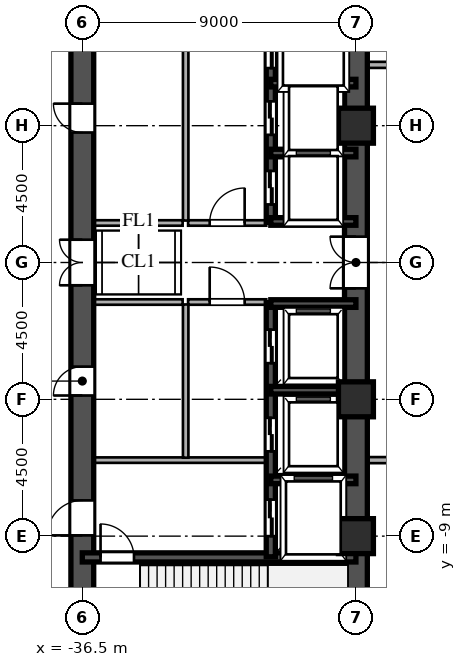
"""IFC4 building model, lengths in metres.
Left out: names, types, materials, properties, quantities, classifications, styles, units other than length and angle.
Written with IfcOpenShell. Run it as: python <this file> out.ifc"""

import sys

from ifc_helpers import new_model, si_unit, direction, frame, frame_2d, origin, origin_2d, place, context, subcontext, project, spatial, rectangle, hollow_rectangle, extrude, source, transform, mapped, element, fill, save


model = new_model("IFC4")
c1 = context("Model", 3, precision=1e-05, world=origin(), true_north=direction((0.0, 1.0)))
c2 = subcontext(c1, "Body", "Model", "MODEL_VIEW")
j1 = project(units=[si_unit("LENGTHUNIT", "METRE"), si_unit("PLANEANGLEUNIT", "RADIAN")], contexts=[c1])
p1 = place(None, origin())
s1 = spatial("IfcSite", under=j1, at=p1, CompositionType="ELEMENT")
p2 = place(p1, origin())
s2 = spatial("IfcBuilding", under=s1, at=p2, CompositionType="ELEMENT")
p3 = place(p2, origin())
s3 = spatial("IfcBuildingStorey", under=s2, at=p3, CompositionType="ELEMENT", Elevation=0.0)
m1 = source(origin(), c2, "Body", "SweptSolid", [
    extrude(hollow_rectangle(XDim=1.15, YDim=1.15, WallThickness=0.048, at=origin_2d()), origin(), (0.0, 0.0, 1.0), 5.4),
])
for number, where, z_axis, x_axis in (
    (1, (-27.5, -9.0, 0.0), (0.0, 0.0, 1.0), (1.0, 0.0, 0.0)),
    (2, (-27.5, -4.5, 0.0), (0.0, 0.0, 1.0), (1.0, 0.0, 0.0)),
    (3, (-27.5, 4.5, 0.0), (0.0, 0.0, 1.0), (1.0, 0.0, 0.0)),
):
    element("IfcColumn", number, at=place(p3, frame(where, z_axis=z_axis, x_axis=x_axis)), inside=s3, PredefinedType="COLUMN", context=c2, shape_type="MappedRepresentation", body=[
        mapped(m1, transform((0.0, 0.0, 0.0), scale=1.0)),
    ])
for number, where, z_axis, x_axis in (
    (4, (-27.5, -13.5, 0.0), (0.0, 0.0, 1.0), (0.0, 1.0, 0.0)),
    (5, (-27.5, 1.3, 0.0), (0.0, 0.0, 1.0), (0.0, 1.0, 0.0)),
):
    element("IfcWall", number, at=place(p3, frame(where, z_axis=z_axis, x_axis=x_axis)), inside=s3, PredefinedType="SHEAR", context=c2, shape_type="SweptSolid", body=[
        extrude(rectangle(XDim=12.2, YDim=0.75, at=frame_2d((6.1, 0.0))), origin(), (0.0, 0.0, 1.0), 5.12),
    ])
p4 = place(p3, frame((-27.5, -1.3, 0.0), z_axis=(0.0, 0.0, 1.0), x_axis=(0.0, 1.0, 0.0)))
e6 = element("IfcWall", 6, at=p4, inside=s3, PredefinedType="SHEAR", context=c2, shape_type="SweptSolid", body=[
    extrude(rectangle(XDim=2.6, YDim=0.75, at=frame_2d((1.3, 0.0))), origin(), (0.0, 0.0, 1.0), 5.12),
])
p5 = place(p4, frame((0.45, 0.0, 0.0)))
e7 = element("IfcOpeningElement", 7, at=p5, cuts=e6, PredefinedType="OPENING", context=c2, shape_type="SweptSolid", body=[
    extrude(rectangle(XDim=1.7, YDim=2.35, at=frame_2d((0.85, 1.175))), frame((0.0, 0.385, 0.0), z_axis=(0.0, -1.0, 0.0), x_axis=(1.0, 0.0, 0.0)), (0.0, 0.0, 1.0), 0.77),
])
p6 = place(p3, frame((-36.5, -13.65, 0.0), z_axis=(0.0, 0.0, 1.0), x_axis=(0.0, 1.0, 0.0)))
e8 = element("IfcWall", 8, at=p6, inside=s3, PredefinedType="SHEAR", context=c2, shape_type="SweptSolid", body=[
    extrude(rectangle(XDim=7.15, YDim=0.75, at=frame_2d((3.575, 0.0))), origin(), (0.0, 0.0, 1.0), 5.12),
])
p7 = place(p6, frame((4.675, 0.0, 0.0)))
e9 = element("IfcOpeningElement", 9, at=p7, cuts=e8, PredefinedType="OPENING", context=c2, shape_type="SweptSolid", body=[
    extrude(rectangle(XDim=1.15, YDim=2.2, at=frame_2d((0.575, 1.1))), frame((0.0, 0.385, 0.0), z_axis=(0.0, -1.0, 0.0), x_axis=(1.0, 0.0, 0.0)), (0.0, 0.0, 1.0), 0.77),
])
p8 = place(p3, frame((-36.5, -1.3, 0.0), z_axis=(0.0, 0.0, 1.0), x_axis=(0.0, 1.0, 0.0)))
e10 = element("IfcWall", 10, at=p8, inside=s3, PredefinedType="SHEAR", context=c2, shape_type="SweptSolid", body=[
    extrude(rectangle(XDim=2.6, YDim=0.75, at=frame_2d((1.3, 0.0))), origin(), (0.0, 0.0, 1.0), 5.12),
])
p9 = place(p8, frame((0.55, 0.0, 0.0)))
e11 = element("IfcOpeningElement", 11, at=p9, cuts=e10, PredefinedType="OPENING", context=c2, shape_type="SweptSolid", body=[
    extrude(rectangle(XDim=1.5, YDim=2.3, at=frame_2d((0.75, 1.15))), frame((0.0, 0.385, 0.0), z_axis=(0.0, -1.0, 0.0), x_axis=(1.0, 0.0, 0.0)), (0.0, 0.0, 1.0), 0.77),
])
p10 = place(p3, frame((-36.5, -6.5, 0.0), z_axis=(0.0, 0.0, 1.0), x_axis=(0.0, 1.0, 0.0)))
e12 = element("IfcWall", 12, at=p10, inside=s3, PredefinedType="SHEAR", context=c2, shape_type="SweptSolid", body=[
    extrude(rectangle(XDim=5.2, YDim=0.75, at=frame_2d((2.6, 0.0))), origin(), (0.0, 0.0, 1.0), 5.12),
])
p11 = place(p10, frame((2.125, 0.0, 0.0)))
e13 = element("IfcOpeningElement", 13, at=p11, cuts=e12, PredefinedType="OPENING", context=c2, shape_type="SweptSolid", body=[
    extrude(rectangle(XDim=0.95, YDim=2.15, at=frame_2d((0.475, 1.075))), frame((0.0, 0.385, 0.0), z_axis=(0.0, -1.0, 0.0), x_axis=(1.0, 0.0, 0.0)), (0.0, 0.0, 1.0), 0.77),
])
p12 = place(p3, frame((-36.5, 1.3, 0.0), z_axis=(0.0, 0.0, 1.0), x_axis=(0.0, 1.0, 0.0)))
e14 = element("IfcWall", 14, at=p12, inside=s3, PredefinedType="SHEAR", context=c2, shape_type="SweptSolid", body=[
    extrude(rectangle(XDim=6.9, YDim=0.75, at=frame_2d((3.45, 0.0))), origin(), (0.0, 0.0, 1.0), 5.12),
])
p13 = place(p12, frame((2.975, 0.0, 0.0)))
e15 = element("IfcOpeningElement", 15, at=p13, cuts=e14, PredefinedType="OPENING", context=c2, shape_type="SweptSolid", body=[
    extrude(rectangle(XDim=0.95, YDim=2.15, at=frame_2d((0.475, 1.075))), frame((0.0, 0.385, 0.0), z_axis=(0.0, -1.0, 0.0), x_axis=(1.0, 0.0, 0.0)), (0.0, 0.0, 1.0), 0.77),
])
p14 = place(p3, frame((-36.5, -9.7, 0.0), z_axis=(0.0, 0.0, 1.0), x_axis=(1.0, 0.0, 0.0)))
e16 = element("IfcWall", 16, at=p14, inside=s3, PredefinedType="SHEAR", context=c2, shape_type="SweptSolid", body=[
    extrude(rectangle(XDim=9.0, YDim=0.3, at=frame_2d((4.5, 0.0))), origin(), (0.0, 0.0, 1.0), 5.12),
])
p15 = place(p14, frame((0.6, 0.0, 0.0)))
e17 = element("IfcOpeningElement", 17, at=p15, cuts=e16, PredefinedType="OPENING", context=c2, shape_type="SweptSolid", body=[
    extrude(rectangle(XDim=1.1, YDim=2.2, at=frame_2d((0.55, 1.1))), frame((0.0, 0.16, 0.0), z_axis=(0.0, -1.0, 0.0), x_axis=(1.0, 0.0, 0.0)), (0.0, 0.0, 1.0), 0.32),
])
for number, where, z_axis, x_axis in (
    (18, (-30.3, -7.15, 0.0), (0.0, 0.0, 1.0), (1.0, 0.0, 0.0)),
    (19, (-30.3, -4.2, 0.0), (0.0, 0.0, 1.0), (1.0, 0.0, 0.0)),
    (20, (-30.3, -1.35, 0.0), (0.0, 0.0, 1.0), (1.0, 0.0, 0.0)),
    (21, (-30.3, 1.35, 0.0), (0.0, 0.0, 1.0), (1.0, 0.0, 0.0)),
    (22, (-30.3, 3.6, 0.0), (0.0, 0.0, 1.0), (1.0, 0.0, 0.0)),
    (23, (-30.3, 5.9, 0.0), (0.0, 0.0, 1.0), (1.0, 0.0, 0.0)),
):
    element("IfcWall", number, at=place(p3, frame(where, z_axis=z_axis, x_axis=x_axis)), inside=s3, PredefinedType="SHEAR", context=c2, shape_type="SweptSolid", body=[
        extrude(rectangle(XDim=2.8, YDim=0.25, at=frame_2d((1.4, 0.0))), origin(), (0.0, 0.0, 1.0), 5.12),
    ])
p16 = place(p3, frame((-30.3, -9.68, 0.0), z_axis=(0.0, 0.0, 1.0), x_axis=(0.0, 1.0, 0.0)))
e24 = element("IfcWall", 24, at=p16, inside=s3, PredefinedType="SHEAR", context=c2, shape_type="SweptSolid", body=[
    extrude(rectangle(XDim=2.56, YDim=0.3, at=frame_2d((1.28, 0.0))), origin(), (0.0, 0.0, 1.0), 5.12),
])
p17 = place(p16, frame((0.68, 0.0, 0.0)))
e25 = element("IfcOpeningElement", 25, at=p17, cuts=e24, PredefinedType="OPENING", context=c2, shape_type="SweptSolid", body=[
    extrude(rectangle(XDim=1.2, YDim=2.25, at=frame_2d((0.6, 1.125))), frame((0.0, 0.16, 0.0), z_axis=(0.0, -1.0, 0.0), x_axis=(1.0, 0.0, 0.0)), (0.0, 0.0, 1.0), 0.32),
])
p18 = place(p3, frame((-30.3, -7.12, 0.0), z_axis=(0.0, 0.0, 1.0), x_axis=(0.0, 1.0, 0.0)))
e26 = element("IfcWall", 26, at=p18, inside=s3, PredefinedType="SHEAR", context=c2, shape_type="SweptSolid", body=[
    extrude(rectangle(XDim=2.92, YDim=0.3, at=frame_2d((1.46, 0.0))), origin(), (0.0, 0.0, 1.0), 5.12),
])
p19 = place(p18, frame((0.91, 0.0, 0.0)))
e27 = element("IfcOpeningElement", 27, at=p19, cuts=e26, PredefinedType="OPENING", context=c2, shape_type="SweptSolid", body=[
    extrude(rectangle(XDim=1.1, YDim=2.2, at=frame_2d((0.55, 1.1))), frame((0.0, 0.16, 0.0), z_axis=(0.0, -1.0, 0.0), x_axis=(1.0, 0.0, 0.0)), (0.0, 0.0, 1.0), 0.32),
])
p20 = place(p3, frame((-30.3, -4.2, 0.0), z_axis=(0.0, 0.0, 1.0), x_axis=(0.0, 1.0, 0.0)))
e28 = element("IfcWall", 28, at=p20, inside=s3, PredefinedType="SHEAR", context=c2, shape_type="SweptSolid", body=[
    extrude(rectangle(XDim=2.88, YDim=0.3, at=frame_2d((1.44, 0.0))), origin(), (0.0, 0.0, 1.0), 5.12),
])
p21 = place(p20, frame((0.89, 0.0, 0.0)))
e29 = element("IfcOpeningElement", 29, at=p21, cuts=e28, PredefinedType="OPENING", context=c2, shape_type="SweptSolid", body=[
    extrude(rectangle(XDim=1.1, YDim=2.2, at=frame_2d((0.55, 1.1))), frame((0.0, 0.16, 0.0), z_axis=(0.0, -1.0, 0.0), x_axis=(1.0, 0.0, 0.0)), (0.0, 0.0, 1.0), 0.32),
])
p22 = place(p3, frame((-30.3, 1.32, 0.0), z_axis=(0.0, 0.0, 1.0), x_axis=(0.0, 1.0, 0.0)))
e30 = element("IfcWall", 30, at=p22, inside=s3, PredefinedType="SHEAR", context=c2, shape_type="SweptSolid", body=[
    extrude(rectangle(XDim=2.28, YDim=0.3, at=frame_2d((1.14, 0.0))), origin(), (0.0, 0.0, 1.0), 5.12),
])
p23 = place(p22, frame((0.59, 0.0, 0.0)))
e31 = element("IfcOpeningElement", 31, at=p23, cuts=e30, PredefinedType="OPENING", context=c2, shape_type="SweptSolid", body=[
    extrude(rectangle(XDim=1.1, YDim=2.2, at=frame_2d((0.55, 1.1))), frame((0.0, 0.16, 0.0), z_axis=(0.0, -1.0, 0.0), x_axis=(1.0, 0.0, 0.0)), (0.0, 0.0, 1.0), 0.32),
])
p24 = place(p3, frame((-30.3, 3.6, 0.0), z_axis=(0.0, 0.0, 1.0), x_axis=(0.0, 1.0, 0.0)))
e32 = element("IfcWall", 32, at=p24, inside=s3, PredefinedType="SHEAR", context=c2, shape_type="SweptSolid", body=[
    extrude(rectangle(XDim=2.3, YDim=0.3, at=frame_2d((1.15, 0.0))), origin(), (0.0, 0.0, 1.0), 5.12),
])
p25 = place(p24, frame((0.6, 0.0, 0.0)))
e33 = element("IfcOpeningElement", 33, at=p25, cuts=e32, PredefinedType="OPENING", context=c2, shape_type="SweptSolid", body=[
    extrude(rectangle(XDim=1.1, YDim=2.2, at=frame_2d((0.55, 1.1))), frame((0.0, 0.16, 0.0), z_axis=(0.0, -1.0, 0.0), x_axis=(1.0, 0.0, 0.0)), (0.0, 0.0, 1.0), 0.32),
])
p26 = place(p3, frame((-30.3, 5.9, 0.0), z_axis=(0.0, 0.0, 1.0), x_axis=(0.0, 1.0, 0.0)))
e34 = element("IfcWall", 34, at=p26, inside=s3, PredefinedType="SHEAR", context=c2, shape_type="SweptSolid", body=[
    extrude(rectangle(XDim=2.25, YDim=0.3, at=frame_2d((1.125, 0.0))), origin(), (0.0, 0.0, 1.0), 5.12),
])
p27 = place(p26, frame((0.495, 0.0, 0.0)))
e35 = element("IfcOpeningElement", 35, at=p27, cuts=e34, PredefinedType="OPENING", context=c2, shape_type="SweptSolid", body=[
    extrude(rectangle(XDim=1.25, YDim=2.3, at=frame_2d((0.625, 1.15))), frame((0.0, 0.16, 0.0), z_axis=(0.0, -1.0, 0.0), x_axis=(1.0, 0.0, 0.0)), (0.0, 0.0, 1.0), 0.32),
])
p28 = place(p3, frame((-36.15, -6.5, 0.0), z_axis=(0.0, 0.0, 1.0), x_axis=(1.0, 0.0, 0.0)))
e36 = element("IfcWall", 36, at=p28, inside=s3, PredefinedType="PARTITIONING", context=c2, shape_type="SweptSolid", body=[
    extrude(rectangle(XDim=5.7, YDim=0.18, at=frame_2d((2.85, 0.0))), origin(), (0.0, 0.0, 1.0), 5.12),
])
p29 = place(p3, frame((-33.1, -6.42, 0.0), z_axis=(0.0, 0.0, 1.0), x_axis=(0.0, 1.0, 0.0)))
e37 = element("IfcWall", 37, at=p29, inside=s3, PredefinedType="PARTITIONING", context=c2, shape_type="SweptSolid", body=[
    extrude(rectangle(XDim=5.04, YDim=0.18, at=frame_2d((2.52, 0.0))), origin(), (0.0, 0.0, 1.0), 5.12),
])
p30 = place(p3, frame((-33.1, 1.38, 0.0), z_axis=(0.0, 0.0, 1.0), x_axis=(0.0, 1.0, 0.0)))
e38 = element("IfcWall", 38, at=p30, inside=s3, PredefinedType="PARTITIONING", context=c2, shape_type="SweptSolid", body=[
    extrude(rectangle(XDim=6.74, YDim=0.18, at=frame_2d((3.37, 0.0))), origin(), (0.0, 0.0, 1.0), 5.12),
])
p31 = place(p3, frame((-33.02, -1.3, 0.0), z_axis=(0.0, 0.0, 1.0), x_axis=(1.0, 0.0, 0.0)))
e39 = element("IfcWall", 39, at=p31, inside=s3, PredefinedType="PARTITIONING", context=c2, shape_type="SweptSolid", body=[
    extrude(rectangle(XDim=2.57, YDim=0.18, at=frame_2d((1.285, 0.0))), origin(), (0.0, 0.0, 1.0), 5.12),
])
p32 = place(p31, frame((0.71, 0.0, 0.0)))
e40 = element("IfcOpeningElement", 40, at=p32, cuts=e39, PredefinedType="OPENING", context=c2, shape_type="SweptSolid", body=[
    extrude(rectangle(XDim=1.15, YDim=2.2, at=frame_2d((0.575, 1.1))), frame((0.0, 0.1, 0.0), z_axis=(0.0, -1.0, 0.0), x_axis=(1.0, 0.0, 0.0)), (0.0, 0.0, 1.0), 0.2),
])
p33 = place(p3, frame((-33.02, 1.3, 0.0), z_axis=(0.0, 0.0, 1.0), x_axis=(1.0, 0.0, 0.0)))
e41 = element("IfcWall", 41, at=p33, inside=s3, PredefinedType="PARTITIONING", context=c2, shape_type="SweptSolid", body=[
    extrude(rectangle(XDim=2.57, YDim=0.18, at=frame_2d((1.285, 0.0))), origin(), (0.0, 0.0, 1.0), 5.12),
])
p34 = place(p33, frame((0.71, 0.0, 0.0)))
e42 = element("IfcOpeningElement", 42, at=p34, cuts=e41, PredefinedType="OPENING", context=c2, shape_type="SweptSolid", body=[
    extrude(rectangle(XDim=1.15, YDim=2.2, at=frame_2d((0.575, 1.1))), frame((0.0, 0.1, 0.0), z_axis=(0.0, -1.0, 0.0), x_axis=(1.0, 0.0, 0.0)), (0.0, 0.0, 1.0), 0.2),
])
for number, where, z_axis, x_axis in (
    (43, (-36.15, -1.3, 0.0), (0.0, 0.0, 1.0), (1.0, 0.0, 0.0)),
    (44, (-36.15, 1.3, 0.0), (0.0, 0.0, 1.0), (1.0, 0.0, 0.0)),
):
    element("IfcWall", number, at=place(p3, frame(where, z_axis=z_axis, x_axis=x_axis)), inside=s3, PredefinedType="PARTITIONING", context=c2, shape_type="SweptSolid", body=[
        extrude(rectangle(XDim=2.95, YDim=0.18, at=frame_2d((1.475, 0.0))), origin(), (0.0, 0.0, 1.0), 5.12),
    ])
p35 = place(p3, frame((-27.12, -6.5, 0.0), z_axis=(0.0, 0.0, 1.0), x_axis=(1.0, 0.0, 0.0)))
e45 = element("IfcWall", 45, at=p35, inside=s3, PredefinedType="PARTITIONING", context=c2, shape_type="SweptSolid", body=[
    extrude(rectangle(XDim=54.24, YDim=0.2, at=frame_2d((27.12, 0.0))), origin(), (0.0, 0.0, 1.0), 5.12),
])
p36 = place(p35, frame((5.145, 0.0, 0.0)))
e46 = element("IfcOpeningElement", 46, at=p36, cuts=e45, PredefinedType="OPENING", context=c2, shape_type="SweptSolid", body=[
    extrude(rectangle(XDim=0.95, YDim=2.15, at=frame_2d((0.475, 1.075))), frame((0.0, 0.11, 0.0), z_axis=(0.0, -1.0, 0.0), x_axis=(1.0, 0.0, 0.0)), (0.0, 0.0, 1.0), 0.22),
])
p37 = place(p35, frame((37.645, 0.0, 0.0)))
e47 = element("IfcOpeningElement", 47, at=p37, cuts=e45, PredefinedType="OPENING", context=c2, shape_type="SweptSolid", body=[
    extrude(rectangle(XDim=0.95, YDim=2.15, at=frame_2d((0.475, 1.075))), frame((0.0, 0.11, 0.0), z_axis=(0.0, -1.0, 0.0), x_axis=(1.0, 0.0, 0.0)), (0.0, 0.0, 1.0), 0.22),
])
p38 = place(p3, frame((-27.12, 6.5, 0.0), z_axis=(0.0, 0.0, 1.0), x_axis=(1.0, 0.0, 0.0)))
e48 = element("IfcWall", 48, at=p38, inside=s3, PredefinedType="PARTITIONING", context=c2, shape_type="SweptSolid", body=[
    extrude(rectangle(XDim=54.24, YDim=0.2, at=frame_2d((27.12, 0.0))), origin(), (0.0, 0.0, 1.0), 5.12),
])
p39 = place(p38, frame((4.045, 0.0, 0.0)))
e49 = element("IfcOpeningElement", 49, at=p39, cuts=e48, PredefinedType="OPENING", context=c2, shape_type="SweptSolid", body=[
    extrude(rectangle(XDim=1.15, YDim=2.2, at=frame_2d((0.575, 1.1))), frame((0.0, 0.11, 0.0), z_axis=(0.0, -1.0, 0.0), x_axis=(1.0, 0.0, 0.0)), (0.0, 0.0, 1.0), 0.22),
])
p40 = place(p38, frame((17.395, 0.0, 0.0)))
e50 = element("IfcOpeningElement", 50, at=p40, cuts=e48, PredefinedType="OPENING", context=c2, shape_type="SweptSolid", body=[
    extrude(rectangle(XDim=0.95, YDim=2.15, at=frame_2d((0.475, 1.075))), frame((0.0, 0.11, 0.0), z_axis=(0.0, -1.0, 0.0), x_axis=(1.0, 0.0, 0.0)), (0.0, 0.0, 1.0), 0.22),
])
p41 = place(p38, frame((47.33, 0.0, 0.0)))
e51 = element("IfcOpeningElement", 51, at=p41, cuts=e48, PredefinedType="OPENING", context=c2, shape_type="SweptSolid", body=[
    extrude(rectangle(XDim=0.88, YDim=2.1, at=frame_2d((0.44, 1.05))), frame((0.0, 0.11, 0.0), z_axis=(0.0, -1.0, 0.0), x_axis=(1.0, 0.0, 0.0)), (0.0, 0.0, 1.0), 0.22),
])
p42 = place(p38, frame((51.68, 0.0, 0.0)))
e52 = element("IfcOpeningElement", 52, at=p42, cuts=e48, PredefinedType="OPENING", context=c2, shape_type="SweptSolid", body=[
    extrude(rectangle(XDim=0.88, YDim=2.1, at=frame_2d((0.44, 1.05))), frame((0.0, 0.11, 0.0), z_axis=(0.0, -1.0, 0.0), x_axis=(1.0, 0.0, 0.0)), (0.0, 0.0, 1.0), 0.22),
])
m2 = source(origin(), c2, "Body", "SweptSolid", [
    extrude(rectangle(XDim=1.7, YDim=2.35, at=frame_2d((0.85, 1.175))), frame((0.0, 0.025, 0.0), z_axis=(0.0, -1.0, 0.0), x_axis=(1.0, 0.0, 0.0)), (0.0, 0.0, 1.0), 0.05),
])
p43 = place(p5, origin())
e53 = element("IfcDoor", 53, at=p43, inside=s3, OperationType="DOUBLE_SWING_LEFT", PredefinedType="DOOR", context=c2, shape_type="MappedRepresentation", body=[
    mapped(m2, transform((0.0, 0.0, 0.0), scale=1.0)),
])
fill(e7, e53)
m3 = source(origin(), c2, "Body", "SweptSolid", [
    extrude(rectangle(XDim=1.15, YDim=2.2, at=frame_2d((0.575, 1.1))), frame((0.0, 0.025, 0.0), z_axis=(0.0, -1.0, 0.0), x_axis=(1.0, 0.0, 0.0)), (0.0, 0.0, 1.0), 0.05),
])
p44 = place(p7, origin())
e54 = element("IfcDoor", 54, at=p44, inside=s3, OperationType="SINGLE_SWING_LEFT", PredefinedType="DOOR", context=c2, shape_type="MappedRepresentation", body=[
    mapped(m3, transform((0.0, 0.0, 0.0), scale=1.0)),
])
fill(e9, e54)
m4 = source(origin(), c2, "Body", "SweptSolid", [
    extrude(rectangle(XDim=1.5, YDim=2.3, at=frame_2d((0.75, 1.15))), frame((0.0, 0.025, 0.0), z_axis=(0.0, -1.0, 0.0), x_axis=(1.0, 0.0, 0.0)), (0.0, 0.0, 1.0), 0.05),
])
p45 = place(p9, origin())
e55 = element("IfcDoor", 55, at=p45, inside=s3, OperationType="DOUBLE_SWING_LEFT", PredefinedType="DOOR", context=c2, shape_type="MappedRepresentation", body=[
    mapped(m4, transform((0.0, 0.0, 0.0), scale=1.0)),
])
fill(e11, e55)
m5 = source(origin(), c2, "Body", "SweptSolid", [
    extrude(rectangle(XDim=0.95, YDim=2.15, at=frame_2d((0.475, 1.075))), frame((0.0, 0.025, 0.0), z_axis=(0.0, -1.0, 0.0), x_axis=(1.0, 0.0, 0.0)), (0.0, 0.0, 1.0), 0.05),
])
p46 = place(p11, origin())
e56 = element("IfcDoor", 56, at=p46, inside=s3, OperationType="SINGLE_SWING_LEFT", PredefinedType="DOOR", context=c2, shape_type="MappedRepresentation", body=[
    mapped(m5, transform((0.0, 0.0, 0.0), scale=1.0)),
])
fill(e13, e56)
p47 = place(p13, origin())
e57 = element("IfcDoor", 57, at=p47, inside=s3, OperationType="SINGLE_SWING_RIGHT", PredefinedType="DOOR", context=c2, shape_type="MappedRepresentation", body=[
    mapped(m5, transform((0.0, 0.0, 0.0), scale=1.0)),
])
fill(e15, e57)
m6 = source(origin(), c2, "Body", "SweptSolid", [
    extrude(rectangle(XDim=1.1, YDim=2.2, at=frame_2d((0.55, 1.1))), frame((0.0, 0.025, 0.0), z_axis=(0.0, -1.0, 0.0), x_axis=(1.0, 0.0, 0.0)), (0.0, 0.0, 1.0), 0.05),
])
p48 = place(p15, origin())
e58 = element("IfcDoor", 58, at=p48, inside=s3, OperationType="SINGLE_SWING_LEFT", PredefinedType="DOOR", context=c2, shape_type="MappedRepresentation", body=[
    mapped(m6, transform((0.0, 0.0, 0.0), scale=1.0)),
])
fill(e17, e58)
m7 = source(origin(), c2, "Body", "SweptSolid", [
    extrude(rectangle(XDim=1.2, YDim=2.25, at=frame_2d((0.6, 1.125))), frame((0.0, 0.025, 0.0), z_axis=(0.0, -1.0, 0.0), x_axis=(1.0, 0.0, 0.0)), (0.0, 0.0, 1.0), 0.05),
])
p49 = place(p17, origin())
e59 = element("IfcDoor", 59, at=p49, inside=s3, OperationType="DOUBLE_DOOR_SLIDING", PredefinedType="DOOR", context=c2, shape_type="MappedRepresentation", body=[
    mapped(m7, transform((0.0, 0.0, 0.0), scale=1.0)),
])
fill(e25, e59)
m8 = source(origin(), c2, "Body", "SweptSolid", [
    extrude(rectangle(XDim=1.1, YDim=2.2, at=frame_2d((0.55, 1.1))), frame((0.0, 0.025, 0.0), z_axis=(0.0, -1.0, 0.0), x_axis=(1.0, 0.0, 0.0)), (0.0, 0.0, 1.0), 0.05),
])
p50 = place(p19, origin())
e60 = element("IfcDoor", 60, at=p50, inside=s3, OperationType="DOUBLE_DOOR_SLIDING", PredefinedType="DOOR", context=c2, shape_type="MappedRepresentation", body=[
    mapped(m8, transform((0.0, 0.0, 0.0), scale=1.0)),
])
fill(e27, e60)
p51 = place(p21, origin())
e61 = element("IfcDoor", 61, at=p51, inside=s3, OperationType="DOUBLE_DOOR_SLIDING", PredefinedType="DOOR", context=c2, shape_type="MappedRepresentation", body=[
    mapped(m8, transform((0.0, 0.0, 0.0), scale=1.0)),
])
fill(e29, e61)
p52 = place(p23, origin())
e62 = element("IfcDoor", 62, at=p52, inside=s3, OperationType="DOUBLE_DOOR_SLIDING", PredefinedType="DOOR", context=c2, shape_type="MappedRepresentation", body=[
    mapped(m8, transform((0.0, 0.0, 0.0), scale=1.0)),
])
fill(e31, e62)
p53 = place(p25, origin())
e63 = element("IfcDoor", 63, at=p53, inside=s3, OperationType="DOUBLE_DOOR_SLIDING", PredefinedType="DOOR", context=c2, shape_type="MappedRepresentation", body=[
    mapped(m8, transform((0.0, 0.0, 0.0), scale=1.0)),
])
fill(e33, e63)
m9 = source(origin(), c2, "Body", "SweptSolid", [
    extrude(rectangle(XDim=1.25, YDim=2.3, at=frame_2d((0.625, 1.15))), frame((0.0, 0.025, 0.0), z_axis=(0.0, -1.0, 0.0), x_axis=(1.0, 0.0, 0.0)), (0.0, 0.0, 1.0), 0.05),
])
p54 = place(p27, origin())
e64 = element("IfcDoor", 64, at=p54, inside=s3, OperationType="DOUBLE_DOOR_SLIDING", PredefinedType="DOOR", context=c2, shape_type="MappedRepresentation", body=[
    mapped(m9, transform((0.0, 0.0, 0.0), scale=1.0)),
])
fill(e35, e64)
p55 = place(p32, origin())
e65 = element("IfcDoor", 65, at=p55, inside=s3, OperationType="SINGLE_SWING_LEFT", PredefinedType="DOOR", context=c2, shape_type="MappedRepresentation", body=[
    mapped(m3, transform((0.0, 0.0, 0.0), scale=1.0)),
])
fill(e40, e65)
p56 = place(p34, origin())
e66 = element("IfcDoor", 66, at=p56, inside=s3, OperationType="SINGLE_SWING_RIGHT", PredefinedType="DOOR", context=c2, shape_type="MappedRepresentation", body=[
    mapped(m3, transform((0.0, 0.0, 0.0), scale=1.0)),
])
fill(e42, e66)
save(model, sys.argv[1])
